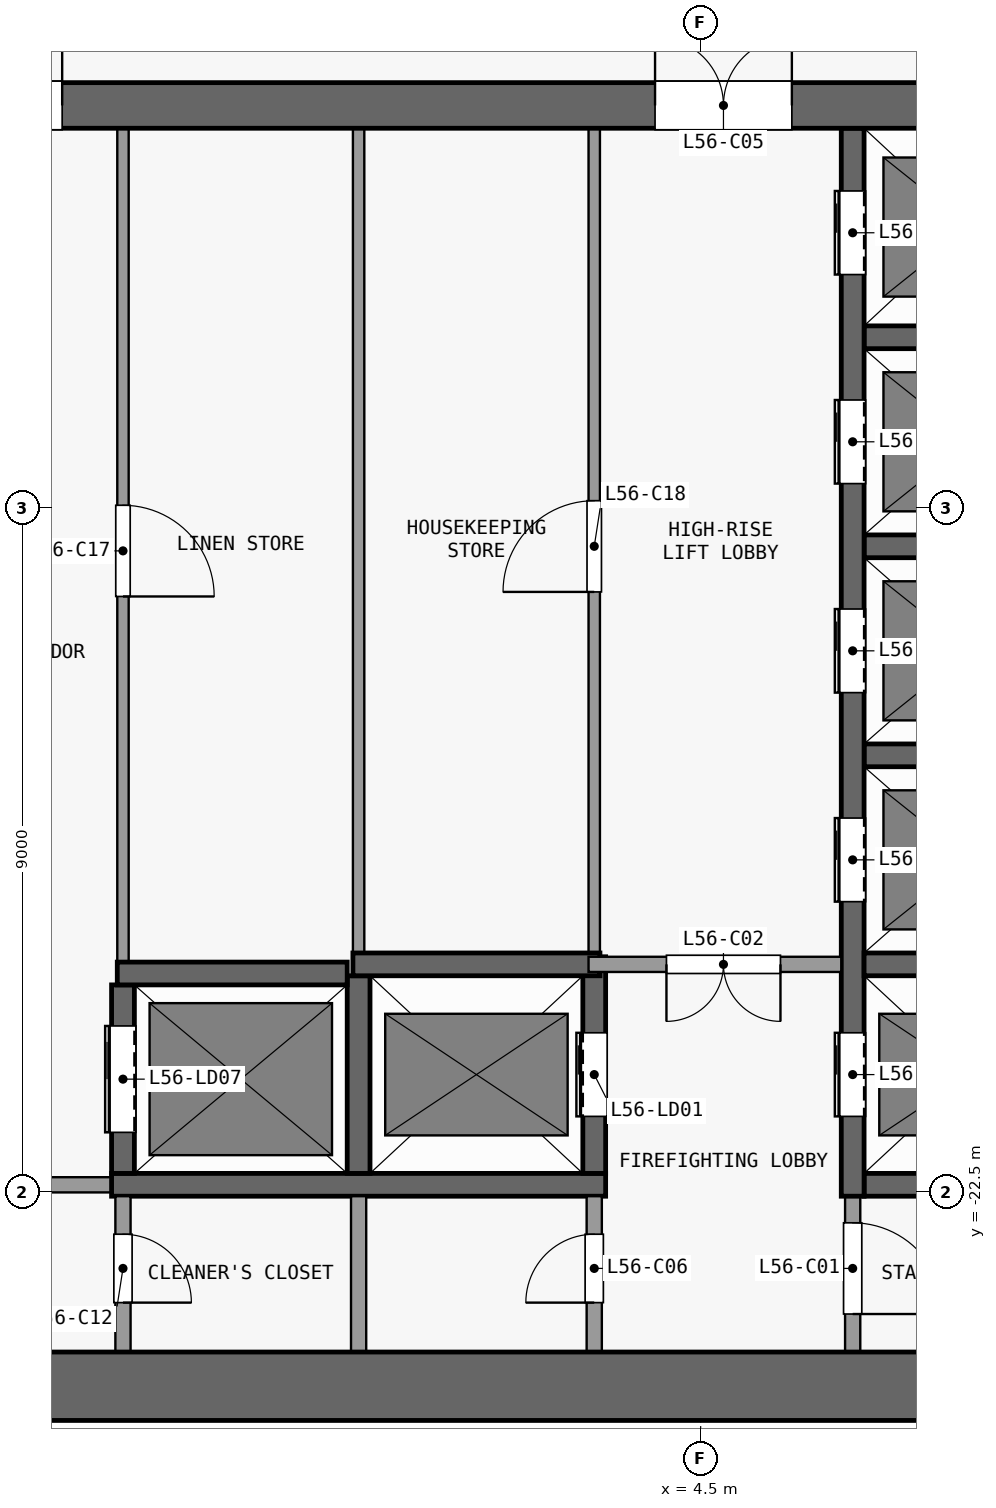
"""IFC4 building model, lengths in metres.
Left out: names, types, materials, properties, quantities, classifications, styles, units other than length and angle.
Written with IfcOpenShell. Run it as: python <this file> out.ifc"""

import sys

from ifc_helpers import new_model, si_unit, direction, frame, frame_2d, origin, place, context, subcontext, project, spatial, rectangle, extrude, element, fill, save


model = new_model("IFC4")
c1 = context("Model", 3, precision=1e-05, world=origin(), true_north=direction((0.0, 1.0)))
c2 = subcontext(c1, "Body", "Model", "MODEL_VIEW")
j1 = project(units=[si_unit("LENGTHUNIT", "METRE"), si_unit("PLANEANGLEUNIT", "RADIAN")], contexts=[c1])
p1 = place(None, origin())
s1 = spatial("IfcSite", under=j1, at=p1, CompositionType="ELEMENT")
p2 = place(p1, origin())
s2 = spatial("IfcBuilding", under=s1, at=p2, CompositionType="ELEMENT")
p3 = place(p2, frame((0.0, 0.0, 223.1)))
s3 = spatial("IfcBuildingStorey", under=s2, at=p3, CompositionType="ELEMENT", Elevation=223.1)
p4 = place(p3, frame((-13.2, -25.05, 0.0), z_axis=(0.0, 0.0, 1.0), x_axis=(1.0, 0.0, 0.0)))
e1 = element("IfcWall", 1, at=p4, inside=s3, PredefinedType="SHEAR", context=c2, shape_type="SweptSolid", body=[
    extrude(rectangle(XDim=26.4, YDim=0.9, at=frame_2d((13.2, 0.0))), origin(), (0.0, 0.0, 1.0), 3.3),
])
p5 = place(p3, frame((-13.2, -8.2, 0.0), z_axis=(0.0, 0.0, 1.0), x_axis=(1.0, 0.0, 0.0)))
e2 = element("IfcWall", 2, at=p5, inside=s3, PredefinedType="SHEAR", context=c2, shape_type="SweptSolid", body=[
    extrude(rectangle(XDim=26.4, YDim=0.6, at=frame_2d((13.2, 0.0))), origin(), (0.0, 0.0, 1.0), 3.3),
])
p6 = place(p5, frame((7.5, 0.0, 0.0)))
e3 = element("IfcOpeningElement", 3, at=p6, cuts=e2, PredefinedType="OPENING", context=c2, shape_type="SweptSolid", body=[
    extrude(rectangle(XDim=1.8, YDim=2.1, at=frame_2d((0.9, 1.05))), frame((0.0, 0.31, 0.0), z_axis=(0.0, -1.0, 0.0), x_axis=(1.0, 0.0, 0.0)), (0.0, 0.0, 1.0), 0.62),
])
p7 = place(p5, frame((17.1, 0.0, 0.0)))
e4 = element("IfcOpeningElement", 4, at=p7, cuts=e2, PredefinedType="OPENING", context=c2, shape_type="SweptSolid", body=[
    extrude(rectangle(XDim=1.8, YDim=2.1, at=frame_2d((0.9, 1.05))), frame((0.0, 0.31, 0.0), z_axis=(0.0, -1.0, 0.0), x_axis=(1.0, 0.0, 0.0)), (0.0, 0.0, 1.0), 0.62),
])
p8 = place(p5, frame((2.425, 0.0, 0.0)))
e5 = element("IfcOpeningElement", 5, at=p8, cuts=e2, PredefinedType="OPENING", context=c2, shape_type="SweptSolid", body=[
    extrude(rectangle(XDim=0.9, YDim=2.1, at=frame_2d((0.45, 1.05))), frame((0.0, 0.31, 0.0), z_axis=(0.0, -1.0, 0.0), x_axis=(1.0, 0.0, 0.0)), (0.0, 0.0, 1.0), 0.62),
])
p9 = place(p5, frame((23.075, 0.0, 0.0)))
e6 = element("IfcOpeningElement", 6, at=p9, cuts=e2, PredefinedType="OPENING", context=c2, shape_type="SweptSolid", body=[
    extrude(rectangle(XDim=0.9, YDim=2.1, at=frame_2d((0.45, 1.05))), frame((0.0, 0.31, 0.0), z_axis=(0.0, -1.0, 0.0), x_axis=(1.0, 0.0, 0.0)), (0.0, 0.0, 1.0), 0.62),
])
p10 = place(p3, frame((-3.25, -22.4, 0.0), z_axis=(0.0, 0.0, 1.0), x_axis=(-1.0, 0.0, 0.0)))
e7 = element("IfcWall", 7, at=p10, inside=s3, PredefinedType="PARTITIONING", context=c2, shape_type="SweptSolid", body=[
    extrude(rectangle(XDim=6.2, YDim=0.2, at=frame_2d((3.1, 0.0))), origin(), (0.0, 0.0, 1.0), 3.3),
])
p11 = place(p10, frame((0.8, 0.0, 0.0)))
e8 = element("IfcOpeningElement", 8, at=p11, cuts=e7, PredefinedType="OPENING", context=c2, shape_type="SweptSolid", body=[
    extrude(rectangle(XDim=1.5, YDim=2.1, at=frame_2d((0.75, 1.05))), frame((0.0, 0.11, 0.0), z_axis=(0.0, -1.0, 0.0), x_axis=(1.0, 0.0, 0.0)), (0.0, 0.0, 1.0), 0.22),
])
p12 = place(p3, frame((-3.25, -22.4, 0.0), z_axis=(0.0, 0.0, 1.0), x_axis=(1.0, 0.0, 0.0)))
e9 = element("IfcWall", 9, at=p12, inside=s3, PredefinedType="SHEAR", context=c2, shape_type="SweptSolid", body=[
    extrude(rectangle(XDim=6.5, YDim=0.3, at=frame_2d((3.25, 0.0))), origin(), (0.0, 0.0, 1.0), 3.3),
])
p13 = place(p3, frame((6.65, -22.4, 0.0), z_axis=(0.0, 0.0, 1.0), x_axis=(1.0, 0.0, 0.0)))
e10 = element("IfcWall", 10, at=p13, inside=s3, PredefinedType="SHEAR", context=c2, shape_type="SweptSolid", body=[
    extrude(rectangle(XDim=2.8, YDim=0.3, at=frame_2d((1.4, 0.0))), origin(), (0.0, 0.0, 1.0), 3.3),
])
p14 = place(p3, frame((-3.175, -19.62, 0.0), z_axis=(0.0, 0.0, 1.0), x_axis=(1.0, 0.0, 0.0)))
e11 = element("IfcWall", 11, at=p14, inside=s3, PredefinedType="SHEAR", context=c2, shape_type="SweptSolid", body=[
    extrude(rectangle(XDim=3.025, YDim=0.3, at=frame_2d((1.513, 0.0))), origin(), (0.0, 0.0, 1.0), 3.3),
])
p15 = place(p3, frame((-0.075, -19.5, 0.0), z_axis=(0.0, 0.0, 1.0), x_axis=(1.0, 0.0, 0.0)))
e12 = element("IfcWall", 12, at=p15, inside=s3, PredefinedType="SHEAR", context=c2, shape_type="SweptSolid", body=[
    extrude(rectangle(XDim=3.25, YDim=0.3, at=frame_2d((1.625, 0.0))), origin(), (0.0, 0.0, 1.0), 3.3),
])
p16 = place(p3, frame((6.35, -19.5, 0.0), z_axis=(0.0, 0.0, 1.0), x_axis=(-1.0, 0.0, 0.0)))
e13 = element("IfcWall", 13, at=p16, inside=s3, PredefinedType="PARTITIONING", context=c2, shape_type="SweptSolid", body=[
    extrude(rectangle(XDim=3.325, YDim=0.2, at=frame_2d((1.663, 0.0))), origin(), (0.0, 0.0, 1.0), 3.3),
])
p17 = place(p16, frame((0.8, 0.0, 0.0)))
e14 = element("IfcOpeningElement", 14, at=p17, cuts=e13, PredefinedType="OPENING", context=c2, shape_type="SweptSolid", body=[
    extrude(rectangle(XDim=1.5, YDim=2.1, at=frame_2d((0.75, 1.05))), frame((0.0, 0.11, 0.0), z_axis=(0.0, -1.0, 0.0), x_axis=(1.0, 0.0, 0.0)), (0.0, 0.0, 1.0), 0.22),
])
for number, where, z_axis, x_axis in (
    (15, (6.65, -19.5, 0.0), (0.0, 0.0, 1.0), (1.0, 0.0, 0.0)),
    (16, (6.65, -16.75, 0.0), (0.0, 0.0, 1.0), (1.0, 0.0, 0.0)),
    (17, (6.65, -14.0, 0.0), (0.0, 0.0, 1.0), (1.0, 0.0, 0.0)),
    (18, (6.65, -11.25, 0.0), (0.0, 0.0, 1.0), (1.0, 0.0, 0.0)),
):
    element("IfcWall", number, at=place(p3, frame(where, z_axis=z_axis, x_axis=x_axis)), inside=s3, PredefinedType="SHEAR", context=c2, shape_type="SweptSolid", body=[
        extrude(rectangle(XDim=2.8, YDim=0.3, at=frame_2d((1.4, 0.0))), origin(), (0.0, 0.0, 1.0), 3.3),
    ])
p18 = place(p3, frame((-3.1, -22.55, 0.0), z_axis=(0.0, 0.0, 1.0), x_axis=(0.0, -1.0, 0.0)))
e19 = element("IfcWall", 19, at=p18, inside=s3, PredefinedType="PARTITIONING", context=c2, shape_type="SweptSolid", body=[
    extrude(rectangle(XDim=2.05, YDim=0.2, at=frame_2d((1.025, 0.0))), origin(), (0.0, 0.0, 1.0), 3.3),
])
p19 = place(p18, frame((0.5, 0.0, 0.0)))
e20 = element("IfcOpeningElement", 20, at=p19, cuts=e19, PredefinedType="OPENING", context=c2, shape_type="SweptSolid", body=[
    extrude(rectangle(XDim=0.9, YDim=2.1, at=frame_2d((0.45, 1.05))), frame((0.0, 0.11, 0.0), z_axis=(0.0, -1.0, 0.0), x_axis=(1.0, 0.0, 0.0)), (0.0, 0.0, 1.0), 0.22),
])
p20 = place(p3, frame((-3.1, -22.25, 0.0), z_axis=(0.0, 0.0, 1.0), x_axis=(0.0, 1.0, 0.0)))
e21 = element("IfcWall", 21, at=p20, inside=s3, PredefinedType="SHEAR", context=c2, shape_type="SweptSolid", body=[
    extrude(rectangle(XDim=2.48, YDim=0.3, at=frame_2d((1.24, 0.0))), origin(), (0.0, 0.0, 1.0), 3.3),
])
p21 = place(p20, frame((0.54, 0.0, 0.0)))
e22 = element("IfcOpeningElement", 22, at=p21, cuts=e21, PredefinedType="OPENING", context=c2, shape_type="SweptSolid", body=[
    extrude(rectangle(XDim=1.4, YDim=2.1, at=frame_2d((0.7, 1.05))), frame((0.0, 0.16, 0.0), z_axis=(0.0, -1.0, 0.0), x_axis=(1.0, 0.0, 0.0)), (0.0, 0.0, 1.0), 0.32),
])
p22 = place(p3, frame((-3.1, -8.5, 0.0), z_axis=(0.0, 0.0, 1.0), x_axis=(0.0, -1.0, 0.0)))
e23 = element("IfcWall", 23, at=p22, inside=s3, PredefinedType="PARTITIONING", context=c2, shape_type="SweptSolid", body=[
    extrude(rectangle(XDim=10.97, YDim=0.15, at=frame_2d((5.485, 0.0))), origin(), (0.0, 0.0, 1.0), 3.3),
])
p23 = place(p22, frame((4.96, 0.0, 0.0)))
e24 = element("IfcOpeningElement", 24, at=p23, cuts=e23, PredefinedType="OPENING", context=c2, shape_type="SweptSolid", body=[
    extrude(rectangle(XDim=1.2, YDim=2.1, at=frame_2d((0.6, 1.05))), frame((0.0, 0.085, 0.0), z_axis=(0.0, -1.0, 0.0), x_axis=(1.0, 0.0, 0.0)), (0.0, 0.0, 1.0), 0.17),
])
p24 = place(p3, frame((0.0, -24.6, 0.0), z_axis=(0.0, 0.0, 1.0), x_axis=(0.0, 1.0, 0.0)))
e25 = element("IfcWall", 25, at=p24, inside=s3, PredefinedType="PARTITIONING", context=c2, shape_type="SweptSolid", body=[
    extrude(rectangle(XDim=2.05, YDim=0.2, at=frame_2d((1.025, 0.0))), origin(), (0.0, 0.0, 1.0), 3.3),
])
p25 = place(p3, frame((0.0, -22.25, 0.0), z_axis=(0.0, 0.0, 1.0), x_axis=(0.0, 1.0, 0.0)))
e26 = element("IfcWall", 26, at=p25, inside=s3, PredefinedType="SHEAR", context=c2, shape_type="SweptSolid", body=[
    extrude(rectangle(XDim=2.6, YDim=0.3, at=frame_2d((1.3, 0.0))), origin(), (0.0, 0.0, 1.0), 3.3),
])
p26 = place(p3, frame((0.0, -19.35, 0.0), z_axis=(0.0, 0.0, 1.0), x_axis=(0.0, 1.0, 0.0)))
e27 = element("IfcWall", 27, at=p26, inside=s3, PredefinedType="PARTITIONING", context=c2, shape_type="SweptSolid", body=[
    extrude(rectangle(XDim=10.85, YDim=0.15, at=frame_2d((5.425, 0.0))), origin(), (0.0, 0.0, 1.0), 3.3),
])
p27 = place(p3, frame((3.1, -24.6, 0.0), z_axis=(0.0, 0.0, 1.0), x_axis=(0.0, 1.0, 0.0)))
e28 = element("IfcWall", 28, at=p27, inside=s3, PredefinedType="PARTITIONING", context=c2, shape_type="SweptSolid", body=[
    extrude(rectangle(XDim=2.05, YDim=0.2, at=frame_2d((1.025, 0.0))), origin(), (0.0, 0.0, 1.0), 3.3),
])
p28 = place(p27, frame((0.65, 0.0, 0.0)))
e29 = element("IfcOpeningElement", 29, at=p28, cuts=e28, PredefinedType="OPENING", context=c2, shape_type="SweptSolid", body=[
    extrude(rectangle(XDim=0.9, YDim=2.1, at=frame_2d((0.45, 1.05))), frame((0.0, 0.11, 0.0), z_axis=(0.0, -1.0, 0.0), x_axis=(1.0, 0.0, 0.0)), (0.0, 0.0, 1.0), 0.22),
])
p29 = place(p3, frame((3.1, -22.25, 0.0), z_axis=(0.0, 0.0, 1.0), x_axis=(0.0, 1.0, 0.0)))
e30 = element("IfcWall", 30, at=p29, inside=s3, PredefinedType="SHEAR", context=c2, shape_type="SweptSolid", body=[
    extrude(rectangle(XDim=2.85, YDim=0.3, at=frame_2d((1.425, 0.0))), origin(), (0.0, 0.0, 1.0), 3.3),
])
p30 = place(p29, frame((0.75, 0.0, 0.0)))
e31 = element("IfcOpeningElement", 31, at=p30, cuts=e30, PredefinedType="OPENING", context=c2, shape_type="SweptSolid", body=[
    extrude(rectangle(XDim=1.1, YDim=2.1, at=frame_2d((0.55, 1.05))), frame((0.0, 0.16, 0.0), z_axis=(0.0, -1.0, 0.0), x_axis=(1.0, 0.0, 0.0)), (0.0, 0.0, 1.0), 0.32),
])
p31 = place(p3, frame((3.1, -19.4, 0.0), z_axis=(0.0, 0.0, 1.0), x_axis=(0.0, 1.0, 0.0)))
e32 = element("IfcWall", 32, at=p31, inside=s3, PredefinedType="PARTITIONING", context=c2, shape_type="SweptSolid", body=[
    extrude(rectangle(XDim=10.9, YDim=0.15, at=frame_2d((5.45, 0.0))), origin(), (0.0, 0.0, 1.0), 3.3),
])
p32 = place(p31, frame((4.8, 0.0, 0.0)))
e33 = element("IfcOpeningElement", 33, at=p32, cuts=e32, PredefinedType="OPENING", context=c2, shape_type="SweptSolid", body=[
    extrude(rectangle(XDim=1.2, YDim=2.1, at=frame_2d((0.6, 1.05))), frame((0.0, 0.085, 0.0), z_axis=(0.0, -1.0, 0.0), x_axis=(1.0, 0.0, 0.0)), (0.0, 0.0, 1.0), 0.17),
])
p33 = place(p3, frame((6.5, -22.55, 0.0), z_axis=(0.0, 0.0, 1.0), x_axis=(0.0, -1.0, 0.0)))
e34 = element("IfcWall", 34, at=p33, inside=s3, PredefinedType="PARTITIONING", context=c2, shape_type="SweptSolid", body=[
    extrude(rectangle(XDim=2.05, YDim=0.2, at=frame_2d((1.025, 0.0))), origin(), (0.0, 0.0, 1.0), 3.3),
])
p34 = place(p33, frame((0.35, 0.0, 0.0)))
e35 = element("IfcOpeningElement", 35, at=p34, cuts=e34, PredefinedType="OPENING", context=c2, shape_type="SweptSolid", body=[
    extrude(rectangle(XDim=1.2, YDim=2.1, at=frame_2d((0.6, 1.05))), frame((0.0, 0.11, 0.0), z_axis=(0.0, -1.0, 0.0), x_axis=(1.0, 0.0, 0.0)), (0.0, 0.0, 1.0), 0.22),
])
p35 = place(p3, frame((6.5, -22.55, 0.0), z_axis=(0.0, 0.0, 1.0), x_axis=(0.0, 1.0, 0.0)))
e36 = element("IfcWall", 36, at=p35, inside=s3, PredefinedType="SHEAR", context=c2, shape_type="SweptSolid", body=[
    extrude(rectangle(XDim=14.05, YDim=0.3, at=frame_2d((7.025, 0.0))), origin(), (0.0, 0.0, 1.0), 3.3),
])
p36 = place(p35, frame((1.05, 0.0, 0.0)))
e37 = element("IfcOpeningElement", 37, at=p36, cuts=e36, PredefinedType="OPENING", context=c2, shape_type="SweptSolid", body=[
    extrude(rectangle(XDim=1.1, YDim=2.1, at=frame_2d((0.55, 1.05))), frame((0.0, 0.16, 0.0), z_axis=(0.0, -1.0, 0.0), x_axis=(1.0, 0.0, 0.0)), (0.0, 0.0, 1.0), 0.32),
])
p37 = place(p35, frame((3.875, 0.0, 0.0)))
e38 = element("IfcOpeningElement", 38, at=p37, cuts=e36, PredefinedType="OPENING", context=c2, shape_type="SweptSolid", body=[
    extrude(rectangle(XDim=1.1, YDim=2.1, at=frame_2d((0.55, 1.05))), frame((0.0, 0.16, 0.0), z_axis=(0.0, -1.0, 0.0), x_axis=(1.0, 0.0, 0.0)), (0.0, 0.0, 1.0), 0.32),
])
p38 = place(p35, frame((6.625, 0.0, 0.0)))
e39 = element("IfcOpeningElement", 39, at=p38, cuts=e36, PredefinedType="OPENING", context=c2, shape_type="SweptSolid", body=[
    extrude(rectangle(XDim=1.1, YDim=2.1, at=frame_2d((0.55, 1.05))), frame((0.0, 0.16, 0.0), z_axis=(0.0, -1.0, 0.0), x_axis=(1.0, 0.0, 0.0)), (0.0, 0.0, 1.0), 0.32),
])
p39 = place(p35, frame((9.375, 0.0, 0.0)))
e40 = element("IfcOpeningElement", 40, at=p39, cuts=e36, PredefinedType="OPENING", context=c2, shape_type="SweptSolid", body=[
    extrude(rectangle(XDim=1.1, YDim=2.1, at=frame_2d((0.55, 1.05))), frame((0.0, 0.16, 0.0), z_axis=(0.0, -1.0, 0.0), x_axis=(1.0, 0.0, 0.0)), (0.0, 0.0, 1.0), 0.32),
])
p40 = place(p35, frame((12.125, 0.0, 0.0)))
e41 = element("IfcOpeningElement", 41, at=p40, cuts=e36, PredefinedType="OPENING", context=c2, shape_type="SweptSolid", body=[
    extrude(rectangle(XDim=1.1, YDim=2.1, at=frame_2d((0.55, 1.05))), frame((0.0, 0.16, 0.0), z_axis=(0.0, -1.0, 0.0), x_axis=(1.0, 0.0, 0.0)), (0.0, 0.0, 1.0), 0.32),
])
p41 = place(p30, origin())
e42 = element("IfcDoor", 42, at=p41, inside=s3, OperationType="DOUBLE_DOOR_SLIDING", PredefinedType="DOOR", context=c2, shape_type="SweptSolid", body=[
    extrude(rectangle(XDim=1.1, YDim=2.1, at=frame_2d((0.55, 1.05))), frame((0.0, 0.025, 0.0), z_axis=(0.0, -1.0, 0.0), x_axis=(1.0, 0.0, 0.0)), (0.0, 0.0, 1.0), 0.05),
])
fill(e31, e42)
p42 = place(p36, origin())
e43 = element("IfcDoor", 43, at=p42, inside=s3, OperationType="DOUBLE_DOOR_SLIDING", PredefinedType="DOOR", context=c2, shape_type="SweptSolid", body=[
    extrude(rectangle(XDim=1.1, YDim=2.1, at=frame_2d((0.55, 1.05))), frame((0.0, 0.025, 0.0), z_axis=(0.0, -1.0, 0.0), x_axis=(1.0, 0.0, 0.0)), (0.0, 0.0, 1.0), 0.05),
])
fill(e37, e43)
p43 = place(p37, origin())
e44 = element("IfcDoor", 44, at=p43, inside=s3, OperationType="DOUBLE_DOOR_SLIDING", PredefinedType="DOOR", context=c2, shape_type="SweptSolid", body=[
    extrude(rectangle(XDim=1.1, YDim=2.1, at=frame_2d((0.55, 1.05))), frame((0.0, 0.025, 0.0), z_axis=(0.0, -1.0, 0.0), x_axis=(1.0, 0.0, 0.0)), (0.0, 0.0, 1.0), 0.05),
])
fill(e38, e44)
p44 = place(p38, origin())
e45 = element("IfcDoor", 45, at=p44, inside=s3, OperationType="DOUBLE_DOOR_SLIDING", PredefinedType="DOOR", context=c2, shape_type="SweptSolid", body=[
    extrude(rectangle(XDim=1.1, YDim=2.1, at=frame_2d((0.55, 1.05))), frame((0.0, 0.025, 0.0), z_axis=(0.0, -1.0, 0.0), x_axis=(1.0, 0.0, 0.0)), (0.0, 0.0, 1.0), 0.05),
])
fill(e39, e45)
p45 = place(p39, origin())
e46 = element("IfcDoor", 46, at=p45, inside=s3, OperationType="DOUBLE_DOOR_SLIDING", PredefinedType="DOOR", context=c2, shape_type="SweptSolid", body=[
    extrude(rectangle(XDim=1.1, YDim=2.1, at=frame_2d((0.55, 1.05))), frame((0.0, 0.025, 0.0), z_axis=(0.0, -1.0, 0.0), x_axis=(1.0, 0.0, 0.0)), (0.0, 0.0, 1.0), 0.05),
])
fill(e40, e46)
p46 = place(p40, origin())
e47 = element("IfcDoor", 47, at=p46, inside=s3, OperationType="DOUBLE_DOOR_SLIDING", PredefinedType="DOOR", context=c2, shape_type="SweptSolid", body=[
    extrude(rectangle(XDim=1.1, YDim=2.1, at=frame_2d((0.55, 1.05))), frame((0.0, 0.025, 0.0), z_axis=(0.0, -1.0, 0.0), x_axis=(1.0, 0.0, 0.0)), (0.0, 0.0, 1.0), 0.05),
])
fill(e41, e47)
p47 = place(p21, origin())
e48 = element("IfcDoor", 48, at=p47, inside=s3, OperationType="DOUBLE_DOOR_SLIDING", PredefinedType="DOOR", context=c2, shape_type="SweptSolid", body=[
    extrude(rectangle(XDim=1.4, YDim=2.1, at=frame_2d((0.7, 1.05))), frame((0.0, 0.025, 0.0), z_axis=(0.0, -1.0, 0.0), x_axis=(1.0, 0.0, 0.0)), (0.0, 0.0, 1.0), 0.05),
])
fill(e22, e48)
p48 = place(p34, origin())
e49 = element("IfcDoor", 49, at=p48, inside=s3, OperationType="SINGLE_SWING_RIGHT", PredefinedType="DOOR", context=c2, shape_type="SweptSolid", body=[
    extrude(rectangle(XDim=1.2, YDim=2.1, at=frame_2d((0.6, 1.05))), frame((0.0, 0.025, 0.0), z_axis=(0.0, -1.0, 0.0), x_axis=(1.0, 0.0, 0.0)), (0.0, 0.0, 1.0), 0.05),
])
fill(e35, e49)
p49 = place(p17, origin())
e50 = element("IfcDoor", 50, at=p49, inside=s3, OperationType="DOUBLE_DOOR_SINGLE_SWING", PredefinedType="DOOR", context=c2, shape_type="SweptSolid", body=[
    extrude(rectangle(XDim=1.5, YDim=2.1, at=frame_2d((0.75, 1.05))), frame((0.0, 0.025, 0.0), z_axis=(0.0, -1.0, 0.0), x_axis=(1.0, 0.0, 0.0)), (0.0, 0.0, 1.0), 0.05),
])
fill(e14, e50)
p50 = place(p6, origin())
e51 = element("IfcDoor", 51, at=p50, inside=s3, OperationType="DOUBLE_DOOR_SINGLE_SWING", PredefinedType="DOOR", context=c2, shape_type="SweptSolid", body=[
    extrude(rectangle(XDim=1.8, YDim=2.1, at=frame_2d((0.9, 1.05))), frame((0.0, 0.025, 0.0), z_axis=(0.0, -1.0, 0.0), x_axis=(1.0, 0.0, 0.0)), (0.0, 0.0, 1.0), 0.05),
])
fill(e3, e51)
p51 = place(p7, origin())
e52 = element("IfcDoor", 52, at=p51, inside=s3, OperationType="DOUBLE_DOOR_SINGLE_SWING", PredefinedType="DOOR", context=c2, shape_type="SweptSolid", body=[
    extrude(rectangle(XDim=1.8, YDim=2.1, at=frame_2d((0.9, 1.05))), frame((0.0, 0.025, 0.0), z_axis=(0.0, -1.0, 0.0), x_axis=(1.0, 0.0, 0.0)), (0.0, 0.0, 1.0), 0.05),
])
fill(e4, e52)
p52 = place(p28, origin())
e53 = element("IfcDoor", 53, at=p52, inside=s3, OperationType="SINGLE_SWING_LEFT", PredefinedType="DOOR", context=c2, shape_type="SweptSolid", body=[
    extrude(rectangle(XDim=0.9, YDim=2.1, at=frame_2d((0.45, 1.05))), frame((0.0, 0.025, 0.0), z_axis=(0.0, -1.0, 0.0), x_axis=(1.0, 0.0, 0.0)), (0.0, 0.0, 1.0), 0.05),
])
fill(e29, e53)
p53 = place(p19, origin())
e54 = element("IfcDoor", 54, at=p53, inside=s3, OperationType="SINGLE_SWING_RIGHT", PredefinedType="DOOR", context=c2, shape_type="SweptSolid", body=[
    extrude(rectangle(XDim=0.9, YDim=2.1, at=frame_2d((0.45, 1.05))), frame((0.0, 0.025, 0.0), z_axis=(0.0, -1.0, 0.0), x_axis=(1.0, 0.0, 0.0)), (0.0, 0.0, 1.0), 0.05),
])
fill(e20, e54)
p54 = place(p23, origin())
e55 = element("IfcDoor", 55, at=p54, inside=s3, OperationType="SINGLE_SWING_RIGHT", PredefinedType="DOOR", context=c2, shape_type="SweptSolid", body=[
    extrude(rectangle(XDim=1.2, YDim=2.1, at=frame_2d((0.6, 1.05))), frame((0.0, 0.025, 0.0), z_axis=(0.0, -1.0, 0.0), x_axis=(1.0, 0.0, 0.0)), (0.0, 0.0, 1.0), 0.05),
])
fill(e24, e55)
p55 = place(p32, origin())
e56 = element("IfcDoor", 56, at=p55, inside=s3, OperationType="SINGLE_SWING_LEFT", PredefinedType="DOOR", context=c2, shape_type="SweptSolid", body=[
    extrude(rectangle(XDim=1.2, YDim=2.1, at=frame_2d((0.6, 1.05))), frame((0.0, 0.025, 0.0), z_axis=(0.0, -1.0, 0.0), x_axis=(1.0, 0.0, 0.0)), (0.0, 0.0, 1.0), 0.05),
])
fill(e33, e56)
save(model, sys.argv[1])
